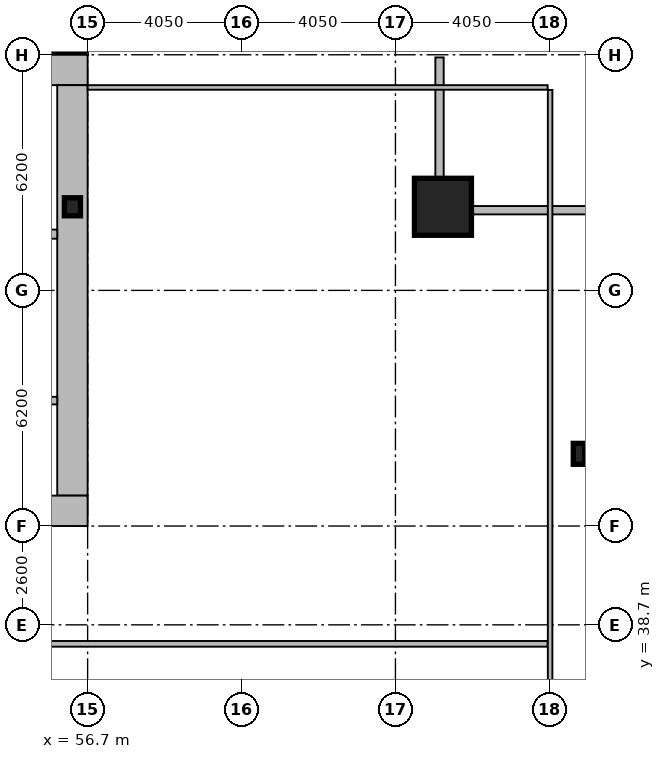
"""IFC4 building model, lengths in metres.
Left out: names, types, materials, properties, quantities, classifications, styles, units other than length and angle.
Written with IfcOpenShell. Run it as: python <this file> out.ifc"""

import sys

from ifc_helpers import new_model, si_unit, direction, frame, frame_2d, origin, origin_2d, place, context, subcontext, project, spatial, rectangle, hollow_rectangle, i_section, extrude, element, fill, save


model = new_model("IFC4")
c1 = context("Model", 3, precision=1e-05, world=origin(), true_north=direction((0.0, 1.0)))
c2 = subcontext(c1, "Body", "Model", "MODEL_VIEW")
j1 = project(units=[si_unit("LENGTHUNIT", "METRE"), si_unit("PLANEANGLEUNIT", "RADIAN")], contexts=[c1])
p1 = place(None, origin())
s1 = spatial("IfcSite", under=j1, at=p1, CompositionType="ELEMENT")
p2 = place(p1, origin())
s2 = spatial("IfcBuilding", under=s1, at=p2, CompositionType="ELEMENT")
p3 = place(p2, frame((0.0, 0.0, 85.8)))
s3 = spatial("IfcBuildingStorey", under=s2, at=p3, CompositionType="ELEMENT", Elevation=85.8)
p4 = place(p3, frame((16.2, 53.3, 0.0), z_axis=(0.0, 0.0, 1.0), x_axis=(1.0, 0.0, 0.0)))
e1 = element("IfcWall", 1, at=p4, inside=s3, PredefinedType="SHEAR", context=c2, shape_type="SweptSolid", body=[
    extrude(rectangle(XDim=40.5, YDim=0.8, at=frame_2d((20.25, 0.0))), origin(), (0.0, 0.0, 1.0), 4.62),
])
p5 = place(p3, frame((56.3, 52.9, 0.0), z_axis=(0.0, 0.0, 1.0), x_axis=(0.0, -1.0, 0.0)))
e2 = element("IfcWall", 2, at=p5, inside=s3, PredefinedType="SHEAR", context=c2, shape_type="SweptSolid", body=[
    extrude(rectangle(XDim=10.8, YDim=0.8, at=frame_2d((5.4, 0.0))), origin(), (0.0, 0.0, 1.0), 4.62),
])
p6 = place(p3, frame((56.7, 41.7, 0.0), z_axis=(0.0, 0.0, 1.0), x_axis=(-1.0, 0.0, 0.0)))
e3 = element("IfcWall", 3, at=p6, inside=s3, PredefinedType="SHEAR", context=c2, shape_type="SweptSolid", body=[
    extrude(rectangle(XDim=2.45, YDim=0.8, at=frame_2d((1.225, 0.0))), origin(), (0.0, 0.0, 1.0), 4.62),
])
p7 = place(p3, frame((48.63, 48.98, 0.0), z_axis=(0.0, 0.0, 1.0), x_axis=(1.0, 0.0, 0.0)))
e4 = element("IfcWall", 4, at=p7, inside=s3, PredefinedType="SHEAR", context=c2, shape_type="SweptSolid", body=[
    extrude(rectangle(XDim=7.27, YDim=0.24, at=frame_2d((3.635, 0.0))), origin(), (0.0, 0.0, 1.0), 4.62),
])
p8 = place(p7, frame((6.0, 0.0, 0.0)))
e5 = element("IfcOpeningElement", 5, at=p8, cuts=e4, PredefinedType="OPENING", context=c2, shape_type="SweptSolid", body=[
    extrude(rectangle(XDim=1.05, YDim=2.15, at=frame_2d((0.525, 1.075))), frame((0.0, 0.13, 0.0), z_axis=(0.0, -1.0, 0.0), x_axis=(1.0, 0.0, 0.0)), (0.0, 0.0, 1.0), 0.26),
])
p9 = place(p3, frame((66.05, 49.7, 0.0), z_axis=(0.0, 0.0, 1.0), x_axis=(1.0, 0.0, 0.0)))
e6 = element("IfcColumn", 6, at=p9, inside=s3, PredefinedType="COLUMN", context=c2, shape_type="SweptSolid", body=[
    extrude(hollow_rectangle(XDim=1.5, YDim=1.5, WallThickness=0.07, at=origin_2d()), origin(), (0.0, 0.0, 1.0), 4.8),
])
p10 = place(p3, frame((69.63, 43.2, 0.0), z_axis=(0.0, 0.0, 1.0), x_axis=(1.0, 0.0, 0.0)))
e7 = element("IfcColumn", 7, at=p10, inside=s3, PredefinedType="COLUMN", context=c2, shape_type="SweptSolid", body=[
    extrude(i_section(OverallWidth=0.3, OverallDepth=0.55, WebThickness=0.015, FlangeThickness=0.029, at=origin_2d()), origin(), (0.0, 0.0, 1.0), 4.8),
])
p11 = place(p3, frame((56.3, 49.7, 0.0), z_axis=(0.0, 0.0, 1.0), x_axis=(1.0, 0.0, 0.0)))
e8 = element("IfcColumn", 8, at=p11, inside=s3, PredefinedType="COLUMN", context=c2, shape_type="SweptSolid", body=[
    extrude(i_section(OverallWidth=0.424, OverallDepth=0.474, WebThickness=0.048, FlangeThickness=0.077, at=origin_2d()), origin(), (0.0, 0.0, 1.0), 4.8),
])
p12 = place(p3, frame((65.96, 53.63, 0.0), z_axis=(0.0, 0.0, 1.0), x_axis=(0.0, -1.0, 0.0)))
e9 = element("IfcWall", 9, at=p12, inside=s3, PredefinedType="SOLIDWALL", context=c2, shape_type="SweptSolid", body=[
    extrude(rectangle(XDim=3.91, YDim=0.22, at=frame_2d((1.955, 0.0))), origin(), (0.0, 0.0, 1.0), 3.96),
])
p13 = place(p3, frame((65.85, 49.61, 0.0), z_axis=(0.0, 0.0, 1.0), x_axis=(1.0, 0.0, 0.0)))
e10 = element("IfcWall", 10, at=p13, inside=s3, PredefinedType="SOLIDWALL", context=c2, shape_type="SweptSolid", body=[
    extrude(rectangle(XDim=4.22, YDim=0.22, at=frame_2d((2.11, 0.0))), origin(), (0.0, 0.0, 1.0), 3.96),
])
p14 = place(p3, frame((51.9, 44.6, 0.0), z_axis=(0.0, 0.0, 1.0), x_axis=(1.0, 0.0, 0.0)))
e11 = element("IfcWall", 11, at=p14, inside=s3, PredefinedType="PARTITIONING", context=c2, shape_type="SweptSolid", body=[
    extrude(rectangle(XDim=4.0, YDim=0.2, at=frame_2d((2.0, 0.0))), origin(), (0.0, 0.0, 1.0), 4.62),
])
p15 = place(p14, frame((1.15, 0.0, 0.0)))
e12 = element("IfcOpeningElement", 12, at=p15, cuts=e11, PredefinedType="OPENING", context=c2, shape_type="SweptSolid", body=[
    extrude(rectangle(XDim=1.05, YDim=2.15, at=frame_2d((0.525, 1.075))), frame((0.0, 0.11, 0.0), z_axis=(0.0, -1.0, 0.0), x_axis=(1.0, 0.0, 0.0)), (0.0, 0.0, 1.0), 0.22),
])
p16 = place(p3, frame((54.35, 38.2, 0.0), z_axis=(0.0, 0.0, 1.0), x_axis=(1.0, 0.0, 0.0)))
e13 = element("IfcWall", 13, at=p16, inside=s3, PredefinedType="PARTITIONING", context=c2, shape_type="SweptSolid", body=[
    extrude(rectangle(XDim=14.455, YDim=0.15, at=frame_2d((7.228, 0.0))), origin(), (0.0, 0.0, 1.0), 3.81),
])
p17 = place(p16, frame((1.8, 0.0, 0.0)))
e14 = element("IfcOpeningElement", 14, at=p17, cuts=e13, PredefinedType="OPENING", context=c2, shape_type="SweptSolid", body=[
    extrude(rectangle(XDim=0.95, YDim=2.1, at=frame_2d((0.475, 1.05))), frame((0.0, 0.085, 0.0), z_axis=(0.0, -1.0, 0.0), x_axis=(1.0, 0.0, 0.0)), (0.0, 0.0, 1.0), 0.17),
])
p18 = place(p3, frame((68.87, 10.665, 0.0), z_axis=(0.0, 0.0, 1.0), x_axis=(0.0, 1.0, 0.0)))
e15 = element("IfcWall", 15, at=p18, inside=s3, PredefinedType="PARTITIONING", context=c2, shape_type="SweptSolid", body=[
    extrude(rectangle(XDim=42.11, YDim=0.12, at=frame_2d((21.055, 0.0))), origin(), (0.0, 0.0, 1.0), 3.81),
])
p19 = place(p3, frame((56.7, 52.84, 0.0), z_axis=(0.0, 0.0, 1.0), x_axis=(1.0, 0.0, 0.0)))
e16 = element("IfcWall", 16, at=p19, inside=s3, PredefinedType="PARTITIONING", context=c2, shape_type="SweptSolid", body=[
    extrude(rectangle(XDim=12.105, YDim=0.12, at=frame_2d((6.052, 0.0))), origin(), (0.0, 0.0, 1.0), 4.62),
])
p20 = place(p17, origin())
e17 = element("IfcDoor", 17, at=p20, inside=s3, OperationType="SINGLE_SWING_LEFT", PredefinedType="DOOR", context=c2, shape_type="SweptSolid", body=[
    extrude(rectangle(XDim=0.95, YDim=2.1, at=frame_2d((0.475, 1.05))), frame((0.0, 0.025, 0.0), z_axis=(0.0, -1.0, 0.0), x_axis=(1.0, 0.0, 0.0)), (0.0, 0.0, 1.0), 0.05),
])
fill(e14, e17)
save(model, sys.argv[1])
